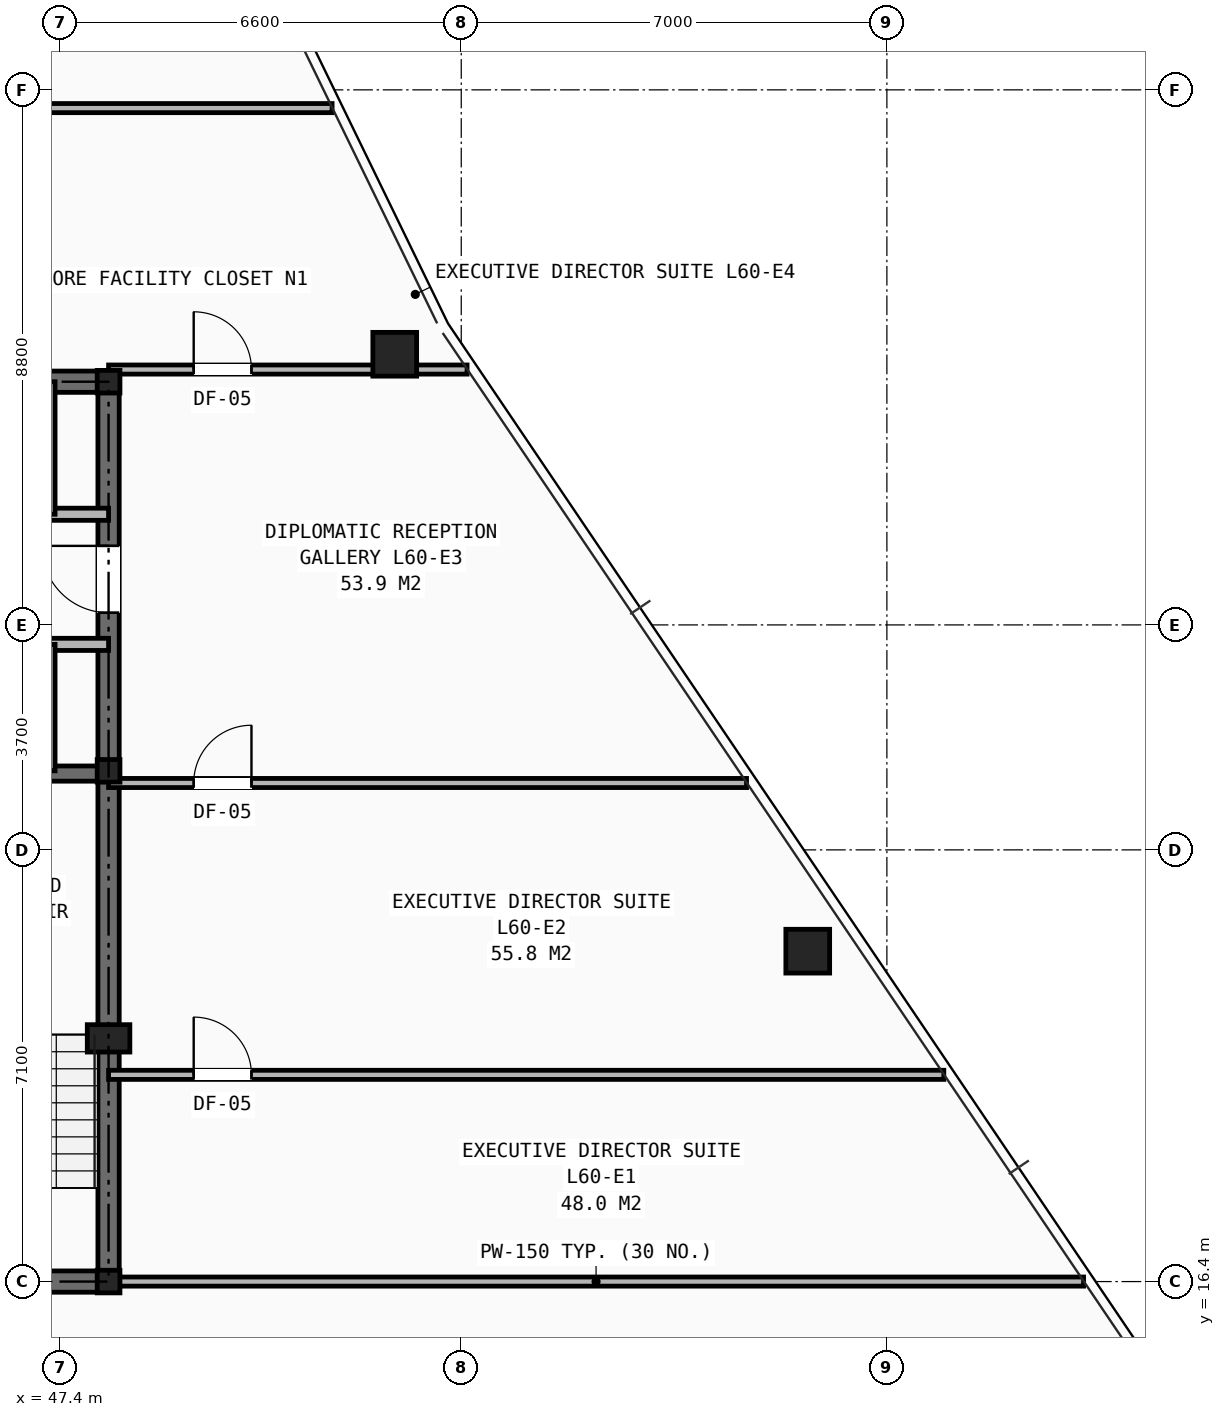
"""IFC4 building model, lengths in metres.
Left out: names, types, materials, properties, quantities, classifications, styles, units other than length and angle.
Written with IfcOpenShell. Run it as: python <this file> out.ifc"""

import sys

from ifc_helpers import new_model, si_unit, direction, frame, frame_2d, origin, origin_2d, place, context, subcontext, project, spatial, rectangle, hollow_rectangle, i_section, extrude, element, fill, save


model = new_model("IFC4")
c1 = context("Model", 3, precision=1e-05, world=origin(), true_north=direction((0.0, 1.0)))
c2 = subcontext(c1, "Body", "Model", "MODEL_VIEW")
j1 = project(units=[si_unit("LENGTHUNIT", "METRE"), si_unit("PLANEANGLEUNIT", "RADIAN")], contexts=[c1])
p1 = place(None, origin())
s1 = spatial("IfcSite", under=j1, at=p1, CompositionType="ELEMENT")
p2 = place(p1, origin())
s2 = spatial("IfcBuilding", under=s1, at=p2, CompositionType="ELEMENT")
p3 = place(p2, frame((0.0, 0.0, 211.9)))
s3 = spatial("IfcBuildingStorey", under=s2, at=p3, CompositionType="ELEMENT", Elevation=211.9)
for number, where, z_axis, x_axis in (
    (1, (48.2, 16.4, 0.0), (0.0, 0.0, 1.0), (1.0, 0.0, 0.0)),
    (2, (48.2, 24.8, 0.0), (0.0, 0.0, 1.0), (1.0, 0.0, 0.0)),
    (3, (48.2, 31.2, 0.0), (0.0, 0.0, 1.0), (1.0, 0.0, 0.0)),
):
    element("IfcColumn", number, at=place(p3, frame(where, z_axis=z_axis, x_axis=x_axis)), inside=s3, PredefinedType="COLUMN", context=c2, shape_type="SweptSolid", body=[
        extrude(i_section(OverallWidth=0.374, OverallDepth=0.372, WebThickness=0.016, FlangeThickness=0.026, at=origin_2d()), origin(), (0.0, 0.0, 1.0), 3.5),
    ])
p4 = place(p3, frame((48.2, 20.4, 0.0), z_axis=(0.0, 0.0, 1.0), x_axis=(1.0, 0.0, 0.0)))
e4 = element("IfcColumn", 4, at=p4, inside=s3, PredefinedType="PILASTER", context=c2, shape_type="SweptSolid", body=[
    extrude(rectangle(XDim=0.7, YDim=0.45, at=origin_2d()), origin(), (0.0, 0.0, 1.0), 3.5),
])
for number, where, z_axis, x_axis in (
    (5, (59.698, 21.834, 0.0), (0.0, 0.0, 1.0), (1.0, 0.0, 0.0)),
    (6, (52.906, 31.652, 0.0), (0.0, 0.0, 1.0), (1.0, 0.0, 0.0)),
):
    element("IfcColumn", number, at=place(p3, frame(where, z_axis=z_axis, x_axis=x_axis)), inside=s3, PredefinedType="COLUMN", context=c2, shape_type="SweptSolid", body=[
        extrude(hollow_rectangle(XDim=0.72, YDim=0.72, WallThickness=0.05, at=origin_2d()), origin(), (0.0, 0.0, 1.0), 3.5),
    ])
p5 = place(p3, frame((31.8, 16.4, 0.0), z_axis=(0.0, 0.0, 1.0), x_axis=(1.0, 0.0, 0.0)))
e7 = element("IfcWall", 7, at=p5, inside=s3, PredefinedType="SHEAR", context=c2, shape_type="SweptSolid", body=[
    extrude(rectangle(XDim=16.4, YDim=0.35, at=frame_2d((8.2, 0.0))), origin(), (0.0, 0.0, 1.0), 3.25),
])
p6 = place(p5, frame((7.75, 0.0, 0.0)))
e8 = element("IfcOpeningElement", 8, at=p6, cuts=e7, PredefinedType="OPENING", context=c2, shape_type="SweptSolid", body=[
    extrude(rectangle(XDim=0.9, YDim=2.1, at=frame_2d((0.45, 1.05))), frame((0.0, 0.185, 0.0), z_axis=(0.0, -1.0, 0.0), x_axis=(1.0, 0.0, 0.0)), (0.0, 0.0, 1.0), 0.37),
])
p7 = place(p5, frame((4.2, 0.0, 0.0)))
e9 = element("IfcOpeningElement", 9, at=p7, cuts=e7, PredefinedType="OPENING", context=c2, shape_type="SweptSolid", body=[
    extrude(rectangle(XDim=0.95, YDim=2.1, at=frame_2d((0.475, 1.05))), frame((0.0, 0.185, 0.0), z_axis=(0.0, -1.0, 0.0), x_axis=(1.0, 0.0, 0.0)), (0.0, 0.0, 1.0), 0.37),
])
p8 = place(p5, frame((10.6, 0.0, 0.0)))
e10 = element("IfcOpeningElement", 10, at=p8, cuts=e7, PredefinedType="OPENING", context=c2, shape_type="SweptSolid", body=[
    extrude(rectangle(XDim=0.95, YDim=2.1, at=frame_2d((0.475, 1.05))), frame((0.0, 0.185, 0.0), z_axis=(0.0, -1.0, 0.0), x_axis=(1.0, 0.0, 0.0)), (0.0, 0.0, 1.0), 0.37),
])
p9 = place(p3, frame((31.8, 31.2, 0.0), z_axis=(0.0, 0.0, 1.0), x_axis=(1.0, 0.0, 0.0)))
e11 = element("IfcWall", 11, at=p9, inside=s3, PredefinedType="SHEAR", context=c2, shape_type="SweptSolid", body=[
    extrude(rectangle(XDim=16.4, YDim=0.35, at=frame_2d((8.2, 0.0))), origin(), (0.0, 0.0, 1.0), 3.25),
])
p10 = place(p3, frame((48.2, 16.4, 0.0), z_axis=(0.0, 0.0, 1.0), x_axis=(0.0, 1.0, 0.0)))
e12 = element("IfcWall", 12, at=p10, inside=s3, PredefinedType="SHEAR", context=c2, shape_type="SweptSolid", body=[
    extrude(rectangle(XDim=14.8, YDim=0.35, at=frame_2d((7.4, 0.0))), origin(), (0.0, 0.0, 1.0), 3.25),
])
p11 = place(p10, frame((11.0, 0.0, 0.0)))
e13 = element("IfcOpeningElement", 13, at=p11, cuts=e12, PredefinedType="OPENING", context=c2, shape_type="SweptSolid", body=[
    extrude(rectangle(XDim=1.1, YDim=2.15, at=frame_2d((0.55, 1.075))), frame((0.0, 0.185, 0.0), z_axis=(0.0, -1.0, 0.0), x_axis=(1.0, 0.0, 0.0)), (0.0, 0.0, 1.0), 0.37),
])
p12 = place(p3, frame((44.955, 24.755, 0.0), z_axis=(0.0, 0.0, 1.0), x_axis=(1.0, 0.0, 0.0)))
e14 = element("IfcWall", 14, at=p12, inside=s3, PredefinedType="SHEAR", context=c2, shape_type="SweptSolid", body=[
    extrude(rectangle(XDim=3.245, YDim=0.25, at=frame_2d((1.623, 0.0))), origin(), (0.0, 0.0, 1.0), 3.25),
])
p13 = place(p3, frame((33.82, 29.02, 0.0), z_axis=(0.0, 0.0, 1.0), x_axis=(1.0, 0.0, 0.0)))
e15 = element("IfcWall", 15, at=p13, inside=s3, PredefinedType="SOLIDWALL", context=c2, shape_type="SweptSolid", body=[
    extrude(rectangle(XDim=14.38, YDim=0.2, at=frame_2d((7.19, 0.0))), origin(), (0.0, 0.0, 1.0), 2.705),
])
p14 = place(p13, frame((1.78, 0.0, 0.0)))
e16 = element("IfcOpeningElement", 16, at=p14, cuts=e15, PredefinedType="OPENING", context=c2, shape_type="SweptSolid", body=[
    extrude(rectangle(XDim=0.9, YDim=2.1, at=frame_2d((0.45, 1.05))), frame((0.0, 0.11, 0.0), z_axis=(0.0, -1.0, 0.0), x_axis=(1.0, 0.0, 0.0)), (0.0, 0.0, 1.0), 0.22),
])
p15 = place(p13, frame((6.07, 0.0, 0.0)))
e17 = element("IfcOpeningElement", 17, at=p15, cuts=e15, PredefinedType="OPENING", context=c2, shape_type="SweptSolid", body=[
    extrude(rectangle(XDim=0.9, YDim=2.1, at=frame_2d((0.45, 1.05))), frame((0.0, 0.11, 0.0), z_axis=(0.0, -1.0, 0.0), x_axis=(1.0, 0.0, 0.0)), (0.0, 0.0, 1.0), 0.22),
])
p16 = place(p13, frame((9.39, 0.0, 0.0)))
e18 = element("IfcOpeningElement", 18, at=p16, cuts=e15, PredefinedType="OPENING", context=c2, shape_type="SweptSolid", body=[
    extrude(rectangle(XDim=1.1, YDim=2.15, at=frame_2d((0.55, 1.075))), frame((0.0, 0.11, 0.0), z_axis=(0.0, -1.0, 0.0), x_axis=(1.0, 0.0, 0.0)), (0.0, 0.0, 1.0), 0.22),
])
p17 = place(p13, frame((11.71, 0.0, 0.0)))
e19 = element("IfcOpeningElement", 19, at=p17, cuts=e15, PredefinedType="OPENING", context=c2, shape_type="SweptSolid", body=[
    extrude(rectangle(XDim=1.1, YDim=2.15, at=frame_2d((0.55, 1.075))), frame((0.0, 0.11, 0.0), z_axis=(0.0, -1.0, 0.0), x_axis=(1.0, 0.0, 0.0)), (0.0, 0.0, 1.0), 0.22),
])
p18 = place(p3, frame((31.8, 26.88, 0.0), z_axis=(0.0, 0.0, 1.0), x_axis=(1.0, 0.0, 0.0)))
e20 = element("IfcWall", 20, at=p18, inside=s3, PredefinedType="SOLIDWALL", context=c2, shape_type="SweptSolid", body=[
    extrude(rectangle(XDim=16.4, YDim=0.2, at=frame_2d((8.2, 0.0))), origin(), (0.0, 0.0, 1.0), 2.705),
])
p19 = place(p18, frame((0.55, 0.0, 0.0)))
e21 = element("IfcOpeningElement", 21, at=p19, cuts=e20, PredefinedType="OPENING", context=c2, shape_type="SweptSolid", body=[
    extrude(rectangle(XDim=0.85, YDim=2.05, at=frame_2d((0.425, 1.025))), frame((0.0, 0.11, 0.0), z_axis=(0.0, -1.0, 0.0), x_axis=(1.0, 0.0, 0.0)), (0.0, 0.0, 1.0), 0.22),
])
p20 = place(p18, frame((5.94, 0.0, 0.0)))
e22 = element("IfcOpeningElement", 22, at=p20, cuts=e20, PredefinedType="OPENING", context=c2, shape_type="SweptSolid", body=[
    extrude(rectangle(XDim=0.9, YDim=2.1, at=frame_2d((0.45, 1.05))), frame((0.0, 0.11, 0.0), z_axis=(0.0, -1.0, 0.0), x_axis=(1.0, 0.0, 0.0)), (0.0, 0.0, 1.0), 0.22),
])
p21 = place(p18, frame((11.41, 0.0, 0.0)))
e23 = element("IfcOpeningElement", 23, at=p21, cuts=e20, PredefinedType="OPENING", context=c2, shape_type="SweptSolid", body=[
    extrude(rectangle(XDim=1.1, YDim=2.15, at=frame_2d((0.55, 1.075))), frame((0.0, 0.11, 0.0), z_axis=(0.0, -1.0, 0.0), x_axis=(1.0, 0.0, 0.0)), (0.0, 0.0, 1.0), 0.22),
])
p22 = place(p18, frame((13.73, 0.0, 0.0)))
e24 = element("IfcOpeningElement", 24, at=p22, cuts=e20, PredefinedType="OPENING", context=c2, shape_type="SweptSolid", body=[
    extrude(rectangle(XDim=1.1, YDim=2.15, at=frame_2d((0.55, 1.075))), frame((0.0, 0.11, 0.0), z_axis=(0.0, -1.0, 0.0), x_axis=(1.0, 0.0, 0.0)), (0.0, 0.0, 1.0), 0.22),
])
p23 = place(p3, frame((47.24, 29.02, 0.0), z_axis=(0.0, 0.0, 1.0), x_axis=(0.0, 1.0, 0.0)))
e25 = element("IfcWall", 25, at=p23, inside=s3, PredefinedType="SOLIDWALL", context=c2, shape_type="SweptSolid", body=[
    extrude(rectangle(XDim=2.18, YDim=0.16, at=frame_2d((1.09, 0.0))), origin(), (0.0, 0.0, 1.0), 2.978),
])
p24 = place(p3, frame((47.24, 24.8, 0.0), z_axis=(0.0, 0.0, 1.0), x_axis=(0.0, 1.0, 0.0)))
e26 = element("IfcWall", 26, at=p24, inside=s3, PredefinedType="SOLIDWALL", context=c2, shape_type="SweptSolid", body=[
    extrude(rectangle(XDim=2.08, YDim=0.16, at=frame_2d((1.04, 0.0))), origin(), (0.0, 0.0, 1.0), 3.25),
])
p25 = place(p3, frame((48.2, 16.4, 0.0), z_axis=(0.0, 0.0, 1.0), x_axis=(1.0, 0.0, 0.0)))
e27 = element("IfcWall", 27, at=p25, inside=s3, PredefinedType="PARTITIONING", context=c2, shape_type="SweptSolid", body=[
    extrude(rectangle(XDim=16.034, YDim=0.15, at=frame_2d((8.017, 0.0))), origin(), (0.0, 0.0, 1.0), 2.265),
])
p26 = place(p3, frame((46.8, 35.7, 0.0), z_axis=(0.0, 0.0, 1.0), x_axis=(1.0, 0.0, 0.0)))
e28 = element("IfcWall", 28, at=p26, inside=s3, PredefinedType="PARTITIONING", context=c2, shape_type="SweptSolid", body=[
    extrude(rectangle(XDim=5.076, YDim=0.15, at=frame_2d((2.538, 0.0))), origin(), (0.0, 0.0, 1.0), 2.628),
])
p27 = place(p3, frame((48.2, 19.8, 0.0), z_axis=(0.0, 0.0, 1.0), x_axis=(1.0, 0.0, 0.0)))
e29 = element("IfcWall", 29, at=p27, inside=s3, PredefinedType="PARTITIONING", context=c2, shape_type="SweptSolid", body=[
    extrude(rectangle(XDim=13.736, YDim=0.15, at=frame_2d((6.868, 0.0))), origin(), (0.0, 0.0, 1.0), 2.265),
])
p28 = place(p27, frame((1.4, 0.0, 0.0)))
e30 = element("IfcOpeningElement", 30, at=p28, cuts=e29, PredefinedType="OPENING", context=c2, shape_type="SweptSolid", body=[
    extrude(rectangle(XDim=0.95, YDim=2.1, at=frame_2d((0.475, 1.05))), frame((0.0, 0.085, 0.0), z_axis=(0.0, -1.0, 0.0), x_axis=(1.0, 0.0, 0.0)), (0.0, 0.0, 1.0), 0.17),
])
p29 = place(p3, frame((48.2, 24.6, 0.0), z_axis=(0.0, 0.0, 1.0), x_axis=(1.0, 0.0, 0.0)))
e31 = element("IfcWall", 31, at=p29, inside=s3, PredefinedType="PARTITIONING", context=c2, shape_type="SweptSolid", body=[
    extrude(rectangle(XDim=10.492, YDim=0.15, at=frame_2d((5.246, 0.0))), origin(), (0.0, 0.0, 1.0), 2.628),
])
p30 = place(p29, frame((1.4, 0.0, 0.0)))
e32 = element("IfcOpeningElement", 32, at=p30, cuts=e31, PredefinedType="OPENING", context=c2, shape_type="SweptSolid", body=[
    extrude(rectangle(XDim=0.95, YDim=2.1, at=frame_2d((0.475, 1.05))), frame((0.0, 0.085, 0.0), z_axis=(0.0, -1.0, 0.0), x_axis=(1.0, 0.0, 0.0)), (0.0, 0.0, 1.0), 0.17),
])
p31 = place(p3, frame((48.2, 31.4, 0.0), z_axis=(0.0, 0.0, 1.0), x_axis=(1.0, 0.0, 0.0)))
e33 = element("IfcWall", 33, at=p31, inside=s3, PredefinedType="PARTITIONING", context=c2, shape_type="SweptSolid", body=[
    extrude(rectangle(XDim=5.896, YDim=0.15, at=frame_2d((2.948, 0.0))), origin(), (0.0, 0.0, 1.0), 2.265),
])
p32 = place(p31, frame((1.4, 0.0, 0.0)))
e34 = element("IfcOpeningElement", 34, at=p32, cuts=e33, PredefinedType="OPENING", context=c2, shape_type="SweptSolid", body=[
    extrude(rectangle(XDim=0.95, YDim=2.1, at=frame_2d((0.475, 1.05))), frame((0.0, 0.085, 0.0), z_axis=(0.0, -1.0, 0.0), x_axis=(1.0, 0.0, 0.0)), (0.0, 0.0, 1.0), 0.17),
])
p33 = place(p11, origin())
e35 = element("IfcDoor", 35, at=p33, inside=s3, OperationType="SINGLE_SWING_RIGHT", PredefinedType="DOOR", context=c2, shape_type="SweptSolid", body=[
    extrude(rectangle(XDim=1.1, YDim=2.15, at=frame_2d((0.55, 1.075))), frame((0.0, 0.025, 0.0), z_axis=(0.0, -1.0, 0.0), x_axis=(1.0, 0.0, 0.0)), (0.0, 0.0, 1.0), 0.05),
])
fill(e13, e35)
p34 = place(p28, origin())
e36 = element("IfcDoor", 36, at=p34, inside=s3, OperationType="SINGLE_SWING_LEFT", PredefinedType="DOOR", context=c2, shape_type="SweptSolid", body=[
    extrude(rectangle(XDim=0.95, YDim=2.1, at=frame_2d((0.475, 1.05))), frame((0.0, 0.025, 0.0), z_axis=(0.0, -1.0, 0.0), x_axis=(1.0, 0.0, 0.0)), (0.0, 0.0, 1.0), 0.05),
])
fill(e30, e36)
p35 = place(p30, origin())
e37 = element("IfcDoor", 37, at=p35, inside=s3, OperationType="SINGLE_SWING_RIGHT", PredefinedType="DOOR", context=c2, shape_type="SweptSolid", body=[
    extrude(rectangle(XDim=0.95, YDim=2.1, at=frame_2d((0.475, 1.05))), frame((0.0, 0.025, 0.0), z_axis=(0.0, -1.0, 0.0), x_axis=(1.0, 0.0, 0.0)), (0.0, 0.0, 1.0), 0.05),
])
fill(e32, e37)
p36 = place(p32, origin())
e38 = element("IfcDoor", 38, at=p36, inside=s3, OperationType="SINGLE_SWING_LEFT", PredefinedType="DOOR", context=c2, shape_type="SweptSolid", body=[
    extrude(rectangle(XDim=0.95, YDim=2.1, at=frame_2d((0.475, 1.05))), frame((0.0, 0.025, 0.0), z_axis=(0.0, -1.0, 0.0), x_axis=(1.0, 0.0, 0.0)), (0.0, 0.0, 1.0), 0.05),
])
fill(e34, e38)
save(model, sys.argv[1])
